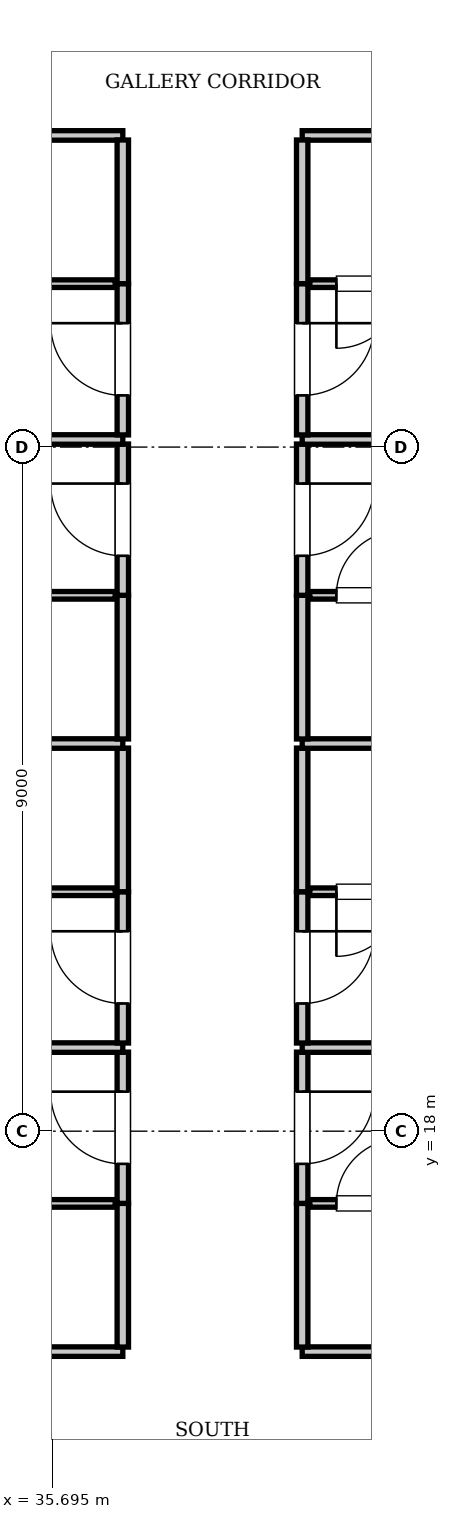
"""IFC4 building model, lengths in metres.
Left out: names, types, materials, properties, quantities, classifications, styles, units other than length and angle.
Written with IfcOpenShell. Run it as: python <this file> out.ifc"""

import sys

from ifc_helpers import new_model, si_unit, direction, frame, frame_2d, origin, place, context, subcontext, project, spatial, rectangle, extrude, element, fill, save


model = new_model("IFC4")
c1 = context("Model", 3, precision=1e-05, world=origin(), true_north=direction((0.0, 1.0)))
c2 = subcontext(c1, "Body", "Model", "MODEL_VIEW")
j1 = project(units=[si_unit("LENGTHUNIT", "METRE"), si_unit("PLANEANGLEUNIT", "RADIAN")], contexts=[c1])
p1 = place(None, origin())
s1 = spatial("IfcSite", under=j1, at=p1, CompositionType="ELEMENT")
p2 = place(p1, origin())
s2 = spatial("IfcBuilding", under=s1, at=p2, CompositionType="ELEMENT")
p3 = place(p2, frame((0.0, 0.0, 127.4)))
s3 = spatial("IfcBuildingStorey", under=s2, at=p3, CompositionType="ELEMENT", Elevation=127.4)
p4 = place(p3, frame((13.2, 15.1, 0.0), z_axis=(0.0, 0.0, 1.0), x_axis=(1.0, 0.0, 0.0)))
e1 = element("IfcWall", 1, at=p4, inside=s3, PredefinedType="PARTITIONING", context=c2, shape_type="SweptSolid", body=[
    extrude(rectangle(XDim=23.42, YDim=0.125, at=frame_2d((11.71, 0.0))), origin(), (0.0, 0.0, 1.0), 3.61),
])
p5 = place(p3, frame((38.98, 15.1, 0.0), z_axis=(0.0, 0.0, 1.0), x_axis=(1.0, 0.0, 0.0)))
e2 = element("IfcWall", 2, at=p5, inside=s3, PredefinedType="PARTITIONING", context=c2, shape_type="SweptSolid", body=[
    extrude(rectangle(XDim=23.42, YDim=0.125, at=frame_2d((11.71, 0.0))), origin(), (0.0, 0.0, 1.0), 3.61),
])
p6 = place(p3, frame((13.2, 31.1, 0.0), z_axis=(0.0, 0.0, 1.0), x_axis=(1.0, 0.0, 0.0)))
e3 = element("IfcWall", 3, at=p6, inside=s3, PredefinedType="PARTITIONING", context=c2, shape_type="SweptSolid", body=[
    extrude(rectangle(XDim=23.42, YDim=0.125, at=frame_2d((11.71, 0.0))), origin(), (0.0, 0.0, 1.0), 3.61),
])
p7 = place(p3, frame((38.98, 31.1, 0.0), z_axis=(0.0, 0.0, 1.0), x_axis=(1.0, 0.0, 0.0)))
e4 = element("IfcWall", 4, at=p7, inside=s3, PredefinedType="PARTITIONING", context=c2, shape_type="SweptSolid", body=[
    extrude(rectangle(XDim=23.42, YDim=0.125, at=frame_2d((11.71, 0.0))), origin(), (0.0, 0.0, 1.0), 3.61),
])
p8 = place(p3, frame((36.62, 15.16, 0.0), z_axis=(0.0, 0.0, 1.0), x_axis=(0.0, 1.0, 0.0)))
e5 = element("IfcWall", 5, at=p8, inside=s3, PredefinedType="PARTITIONING", context=c2, shape_type="SweptSolid", body=[
    extrude(rectangle(XDim=1.89, YDim=0.15, at=frame_2d((0.945, 0.0))), origin(), (0.0, 0.0, 1.0), 3.61),
])
p9 = place(p3, frame((36.62, 17.05, 0.0), z_axis=(0.0, 0.0, 1.0), x_axis=(0.0, 1.0, 0.0)))
e6 = element("IfcWall", 6, at=p9, inside=s3, PredefinedType="PARTITIONING", context=c2, shape_type="SweptSolid", body=[
    extrude(rectangle(XDim=1.99, YDim=0.15, at=frame_2d((0.995, 0.0))), origin(), (0.0, 0.0, 1.0), 3.61),
])
p10 = place(p9, frame((0.52, 0.0, 0.0)))
e7 = element("IfcOpeningElement", 7, at=p10, cuts=e6, PredefinedType="OPENING", context=c2, shape_type="SweptSolid", body=[
    extrude(rectangle(XDim=0.95, YDim=2.15, at=frame_2d((0.475, 1.075))), frame((0.0, 0.085, 0.0), z_axis=(0.0, -1.0, 0.0), x_axis=(1.0, 0.0, 0.0)), (0.0, 0.0, 1.0), 0.17),
])
p11 = place(p3, frame((34.22, 17.05, 0.0), z_axis=(0.0, 0.0, 1.0), x_axis=(1.0, 0.0, 0.0)))
e8 = element("IfcWall", 8, at=p11, inside=s3, PredefinedType="PARTITIONING", context=c2, shape_type="SweptSolid", body=[
    extrude(rectangle(XDim=2.3, YDim=0.1, at=frame_2d((1.15, 0.0))), origin(), (0.0, 0.0, 1.0), 3.61),
])
p12 = place(p11, frame((0.35, 0.0, 0.0)))
e9 = element("IfcOpeningElement", 9, at=p12, cuts=e8, PredefinedType="OPENING", context=c2, shape_type="SweptSolid", body=[
    extrude(rectangle(XDim=0.85, YDim=2.1, at=frame_2d((0.425, 1.05))), frame((0.0, 0.06, 0.0), z_axis=(0.0, -1.0, 0.0), x_axis=(1.0, 0.0, 0.0)), (0.0, 0.0, 1.0), 0.12),
])
p13 = place(p3, frame((38.98, 15.16, 0.0), z_axis=(0.0, 0.0, 1.0), x_axis=(0.0, 1.0, 0.0)))
e10 = element("IfcWall", 10, at=p13, inside=s3, PredefinedType="PARTITIONING", context=c2, shape_type="SweptSolid", body=[
    extrude(rectangle(XDim=1.89, YDim=0.15, at=frame_2d((0.945, 0.0))), origin(), (0.0, 0.0, 1.0), 3.61),
])
p14 = place(p3, frame((38.98, 17.05, 0.0), z_axis=(0.0, 0.0, 1.0), x_axis=(0.0, 1.0, 0.0)))
e11 = element("IfcWall", 11, at=p14, inside=s3, PredefinedType="PARTITIONING", context=c2, shape_type="SweptSolid", body=[
    extrude(rectangle(XDim=1.99, YDim=0.15, at=frame_2d((0.995, 0.0))), origin(), (0.0, 0.0, 1.0), 3.61),
])
p15 = place(p14, frame((0.52, 0.0, 0.0)))
e12 = element("IfcOpeningElement", 12, at=p15, cuts=e11, PredefinedType="OPENING", context=c2, shape_type="SweptSolid", body=[
    extrude(rectangle(XDim=0.95, YDim=2.15, at=frame_2d((0.475, 1.075))), frame((0.0, 0.085, 0.0), z_axis=(0.0, -1.0, 0.0), x_axis=(1.0, 0.0, 0.0)), (0.0, 0.0, 1.0), 0.17),
])
p16 = place(p3, frame((39.08, 17.05, 0.0), z_axis=(0.0, 0.0, 1.0), x_axis=(1.0, 0.0, 0.0)))
e13 = element("IfcWall", 13, at=p16, inside=s3, PredefinedType="PARTITIONING", context=c2, shape_type="SweptSolid", body=[
    extrude(rectangle(XDim=2.3, YDim=0.1, at=frame_2d((1.15, 0.0))), origin(), (0.0, 0.0, 1.0), 3.61),
])
p17 = place(p16, frame((0.35, 0.0, 0.0)))
e14 = element("IfcOpeningElement", 14, at=p17, cuts=e13, PredefinedType="OPENING", context=c2, shape_type="SweptSolid", body=[
    extrude(rectangle(XDim=0.85, YDim=2.1, at=frame_2d((0.425, 1.05))), frame((0.0, 0.06, 0.0), z_axis=(0.0, -1.0, 0.0), x_axis=(1.0, 0.0, 0.0)), (0.0, 0.0, 1.0), 0.12),
])
p18 = place(p3, frame((13.2, 19.1, 0.0), z_axis=(0.0, 0.0, 1.0), x_axis=(1.0, 0.0, 0.0)))
e15 = element("IfcWall", 15, at=p18, inside=s3, PredefinedType="PARTITIONING", context=c2, shape_type="SweptSolid", body=[
    extrude(rectangle(XDim=23.42, YDim=0.125, at=frame_2d((11.71, 0.0))), origin(), (0.0, 0.0, 1.0), 3.61),
])
p19 = place(p3, frame((38.98, 19.1, 0.0), z_axis=(0.0, 0.0, 1.0), x_axis=(1.0, 0.0, 0.0)))
e16 = element("IfcWall", 16, at=p19, inside=s3, PredefinedType="PARTITIONING", context=c2, shape_type="SweptSolid", body=[
    extrude(rectangle(XDim=23.42, YDim=0.125, at=frame_2d((11.71, 0.0))), origin(), (0.0, 0.0, 1.0), 3.61),
])
p20 = place(p3, frame((36.62, 19.16, 0.0), z_axis=(0.0, 0.0, 1.0), x_axis=(0.0, 1.0, 0.0)))
e17 = element("IfcWall", 17, at=p20, inside=s3, PredefinedType="PARTITIONING", context=c2, shape_type="SweptSolid", body=[
    extrude(rectangle(XDim=1.99, YDim=0.15, at=frame_2d((0.995, 0.0))), origin(), (0.0, 0.0, 1.0), 3.61),
])
p21 = place(p20, frame((0.52, 0.0, 0.0)))
e18 = element("IfcOpeningElement", 18, at=p21, cuts=e17, PredefinedType="OPENING", context=c2, shape_type="SweptSolid", body=[
    extrude(rectangle(XDim=0.95, YDim=2.15, at=frame_2d((0.475, 1.075))), frame((0.0, 0.085, 0.0), z_axis=(0.0, -1.0, 0.0), x_axis=(1.0, 0.0, 0.0)), (0.0, 0.0, 1.0), 0.17),
])
p22 = place(p3, frame((36.62, 21.15, 0.0), z_axis=(0.0, 0.0, 1.0), x_axis=(0.0, 1.0, 0.0)))
e19 = element("IfcWall", 19, at=p22, inside=s3, PredefinedType="PARTITIONING", context=c2, shape_type="SweptSolid", body=[
    extrude(rectangle(XDim=1.89, YDim=0.15, at=frame_2d((0.945, 0.0))), origin(), (0.0, 0.0, 1.0), 3.61),
])
p23 = place(p3, frame((34.22, 21.15, 0.0), z_axis=(0.0, 0.0, 1.0), x_axis=(1.0, 0.0, 0.0)))
e20 = element("IfcWall", 20, at=p23, inside=s3, PredefinedType="PARTITIONING", context=c2, shape_type="SweptSolid", body=[
    extrude(rectangle(XDim=2.3, YDim=0.1, at=frame_2d((1.15, 0.0))), origin(), (0.0, 0.0, 1.0), 3.61),
])
p24 = place(p23, frame((0.35, 0.0, 0.0)))
e21 = element("IfcOpeningElement", 21, at=p24, cuts=e20, PredefinedType="OPENING", context=c2, shape_type="SweptSolid", body=[
    extrude(rectangle(XDim=0.85, YDim=2.1, at=frame_2d((0.425, 1.05))), frame((0.0, 0.06, 0.0), z_axis=(0.0, -1.0, 0.0), x_axis=(1.0, 0.0, 0.0)), (0.0, 0.0, 1.0), 0.12),
])
p25 = place(p3, frame((38.98, 19.16, 0.0), z_axis=(0.0, 0.0, 1.0), x_axis=(0.0, 1.0, 0.0)))
e22 = element("IfcWall", 22, at=p25, inside=s3, PredefinedType="PARTITIONING", context=c2, shape_type="SweptSolid", body=[
    extrude(rectangle(XDim=1.99, YDim=0.15, at=frame_2d((0.995, 0.0))), origin(), (0.0, 0.0, 1.0), 3.61),
])
p26 = place(p25, frame((0.52, 0.0, 0.0)))
e23 = element("IfcOpeningElement", 23, at=p26, cuts=e22, PredefinedType="OPENING", context=c2, shape_type="SweptSolid", body=[
    extrude(rectangle(XDim=0.95, YDim=2.15, at=frame_2d((0.475, 1.075))), frame((0.0, 0.085, 0.0), z_axis=(0.0, -1.0, 0.0), x_axis=(1.0, 0.0, 0.0)), (0.0, 0.0, 1.0), 0.17),
])
p27 = place(p3, frame((38.98, 21.15, 0.0), z_axis=(0.0, 0.0, 1.0), x_axis=(0.0, 1.0, 0.0)))
e24 = element("IfcWall", 24, at=p27, inside=s3, PredefinedType="PARTITIONING", context=c2, shape_type="SweptSolid", body=[
    extrude(rectangle(XDim=1.89, YDim=0.15, at=frame_2d((0.945, 0.0))), origin(), (0.0, 0.0, 1.0), 3.61),
])
p28 = place(p3, frame((39.08, 21.15, 0.0), z_axis=(0.0, 0.0, 1.0), x_axis=(1.0, 0.0, 0.0)))
e25 = element("IfcWall", 25, at=p28, inside=s3, PredefinedType="PARTITIONING", context=c2, shape_type="SweptSolid", body=[
    extrude(rectangle(XDim=2.3, YDim=0.1, at=frame_2d((1.15, 0.0))), origin(), (0.0, 0.0, 1.0), 3.61),
])
p29 = place(p28, frame((0.35, 0.0, 0.0)))
e26 = element("IfcOpeningElement", 26, at=p29, cuts=e25, PredefinedType="OPENING", context=c2, shape_type="SweptSolid", body=[
    extrude(rectangle(XDim=0.85, YDim=2.1, at=frame_2d((0.425, 1.05))), frame((0.0, 0.06, 0.0), z_axis=(0.0, -1.0, 0.0), x_axis=(1.0, 0.0, 0.0)), (0.0, 0.0, 1.0), 0.12),
])
p30 = place(p3, frame((13.2, 23.1, 0.0), z_axis=(0.0, 0.0, 1.0), x_axis=(1.0, 0.0, 0.0)))
e27 = element("IfcWall", 27, at=p30, inside=s3, PredefinedType="PARTITIONING", context=c2, shape_type="SweptSolid", body=[
    extrude(rectangle(XDim=23.42, YDim=0.125, at=frame_2d((11.71, 0.0))), origin(), (0.0, 0.0, 1.0), 3.61),
])
p31 = place(p3, frame((38.98, 23.1, 0.0), z_axis=(0.0, 0.0, 1.0), x_axis=(1.0, 0.0, 0.0)))
e28 = element("IfcWall", 28, at=p31, inside=s3, PredefinedType="PARTITIONING", context=c2, shape_type="SweptSolid", body=[
    extrude(rectangle(XDim=23.42, YDim=0.125, at=frame_2d((11.71, 0.0))), origin(), (0.0, 0.0, 1.0), 3.61),
])
p32 = place(p3, frame((36.62, 23.16, 0.0), z_axis=(0.0, 0.0, 1.0), x_axis=(0.0, 1.0, 0.0)))
e29 = element("IfcWall", 29, at=p32, inside=s3, PredefinedType="PARTITIONING", context=c2, shape_type="SweptSolid", body=[
    extrude(rectangle(XDim=1.89, YDim=0.15, at=frame_2d((0.945, 0.0))), origin(), (0.0, 0.0, 1.0), 3.61),
])
p33 = place(p3, frame((36.62, 25.05, 0.0), z_axis=(0.0, 0.0, 1.0), x_axis=(0.0, 1.0, 0.0)))
e30 = element("IfcWall", 30, at=p33, inside=s3, PredefinedType="PARTITIONING", context=c2, shape_type="SweptSolid", body=[
    extrude(rectangle(XDim=1.99, YDim=0.15, at=frame_2d((0.995, 0.0))), origin(), (0.0, 0.0, 1.0), 3.61),
])
p34 = place(p33, frame((0.52, 0.0, 0.0)))
e31 = element("IfcOpeningElement", 31, at=p34, cuts=e30, PredefinedType="OPENING", context=c2, shape_type="SweptSolid", body=[
    extrude(rectangle(XDim=0.95, YDim=2.15, at=frame_2d((0.475, 1.075))), frame((0.0, 0.085, 0.0), z_axis=(0.0, -1.0, 0.0), x_axis=(1.0, 0.0, 0.0)), (0.0, 0.0, 1.0), 0.17),
])
p35 = place(p3, frame((34.22, 25.05, 0.0), z_axis=(0.0, 0.0, 1.0), x_axis=(1.0, 0.0, 0.0)))
e32 = element("IfcWall", 32, at=p35, inside=s3, PredefinedType="PARTITIONING", context=c2, shape_type="SweptSolid", body=[
    extrude(rectangle(XDim=2.3, YDim=0.1, at=frame_2d((1.15, 0.0))), origin(), (0.0, 0.0, 1.0), 3.61),
])
p36 = place(p35, frame((0.35, 0.0, 0.0)))
e33 = element("IfcOpeningElement", 33, at=p36, cuts=e32, PredefinedType="OPENING", context=c2, shape_type="SweptSolid", body=[
    extrude(rectangle(XDim=0.85, YDim=2.1, at=frame_2d((0.425, 1.05))), frame((0.0, 0.06, 0.0), z_axis=(0.0, -1.0, 0.0), x_axis=(1.0, 0.0, 0.0)), (0.0, 0.0, 1.0), 0.12),
])
p37 = place(p3, frame((38.98, 23.16, 0.0), z_axis=(0.0, 0.0, 1.0), x_axis=(0.0, 1.0, 0.0)))
e34 = element("IfcWall", 34, at=p37, inside=s3, PredefinedType="PARTITIONING", context=c2, shape_type="SweptSolid", body=[
    extrude(rectangle(XDim=1.89, YDim=0.15, at=frame_2d((0.945, 0.0))), origin(), (0.0, 0.0, 1.0), 3.61),
])
p38 = place(p3, frame((38.98, 25.05, 0.0), z_axis=(0.0, 0.0, 1.0), x_axis=(0.0, 1.0, 0.0)))
e35 = element("IfcWall", 35, at=p38, inside=s3, PredefinedType="PARTITIONING", context=c2, shape_type="SweptSolid", body=[
    extrude(rectangle(XDim=1.99, YDim=0.15, at=frame_2d((0.995, 0.0))), origin(), (0.0, 0.0, 1.0), 3.61),
])
p39 = place(p38, frame((0.52, 0.0, 0.0)))
e36 = element("IfcOpeningElement", 36, at=p39, cuts=e35, PredefinedType="OPENING", context=c2, shape_type="SweptSolid", body=[
    extrude(rectangle(XDim=0.95, YDim=2.15, at=frame_2d((0.475, 1.075))), frame((0.0, 0.085, 0.0), z_axis=(0.0, -1.0, 0.0), x_axis=(1.0, 0.0, 0.0)), (0.0, 0.0, 1.0), 0.17),
])
p40 = place(p3, frame((39.08, 25.05, 0.0), z_axis=(0.0, 0.0, 1.0), x_axis=(1.0, 0.0, 0.0)))
e37 = element("IfcWall", 37, at=p40, inside=s3, PredefinedType="PARTITIONING", context=c2, shape_type="SweptSolid", body=[
    extrude(rectangle(XDim=2.3, YDim=0.1, at=frame_2d((1.15, 0.0))), origin(), (0.0, 0.0, 1.0), 3.61),
])
p41 = place(p40, frame((0.35, 0.0, 0.0)))
e38 = element("IfcOpeningElement", 38, at=p41, cuts=e37, PredefinedType="OPENING", context=c2, shape_type="SweptSolid", body=[
    extrude(rectangle(XDim=0.85, YDim=2.1, at=frame_2d((0.425, 1.05))), frame((0.0, 0.06, 0.0), z_axis=(0.0, -1.0, 0.0), x_axis=(1.0, 0.0, 0.0)), (0.0, 0.0, 1.0), 0.12),
])
p42 = place(p3, frame((13.2, 27.1, 0.0), z_axis=(0.0, 0.0, 1.0), x_axis=(1.0, 0.0, 0.0)))
e39 = element("IfcWall", 39, at=p42, inside=s3, PredefinedType="PARTITIONING", context=c2, shape_type="SweptSolid", body=[
    extrude(rectangle(XDim=23.42, YDim=0.125, at=frame_2d((11.71, 0.0))), origin(), (0.0, 0.0, 1.0), 2.41),
])
p43 = place(p3, frame((38.98, 27.1, 0.0), z_axis=(0.0, 0.0, 1.0), x_axis=(1.0, 0.0, 0.0)))
e40 = element("IfcWall", 40, at=p43, inside=s3, PredefinedType="PARTITIONING", context=c2, shape_type="SweptSolid", body=[
    extrude(rectangle(XDim=23.42, YDim=0.125, at=frame_2d((11.71, 0.0))), origin(), (0.0, 0.0, 1.0), 2.41),
])
p44 = place(p3, frame((36.62, 27.16, 0.0), z_axis=(0.0, 0.0, 1.0), x_axis=(0.0, 1.0, 0.0)))
e41 = element("IfcWall", 41, at=p44, inside=s3, PredefinedType="PARTITIONING", context=c2, shape_type="SweptSolid", body=[
    extrude(rectangle(XDim=1.99, YDim=0.15, at=frame_2d((0.995, 0.0))), origin(), (0.0, 0.0, 1.0), 3.61),
])
p45 = place(p44, frame((0.52, 0.0, 0.0)))
e42 = element("IfcOpeningElement", 42, at=p45, cuts=e41, PredefinedType="OPENING", context=c2, shape_type="SweptSolid", body=[
    extrude(rectangle(XDim=0.95, YDim=2.15, at=frame_2d((0.475, 1.075))), frame((0.0, 0.085, 0.0), z_axis=(0.0, -1.0, 0.0), x_axis=(1.0, 0.0, 0.0)), (0.0, 0.0, 1.0), 0.17),
])
p46 = place(p3, frame((36.62, 29.15, 0.0), z_axis=(0.0, 0.0, 1.0), x_axis=(0.0, 1.0, 0.0)))
e43 = element("IfcWall", 43, at=p46, inside=s3, PredefinedType="PARTITIONING", context=c2, shape_type="SweptSolid", body=[
    extrude(rectangle(XDim=1.89, YDim=0.15, at=frame_2d((0.945, 0.0))), origin(), (0.0, 0.0, 1.0), 3.61),
])
p47 = place(p3, frame((34.22, 29.15, 0.0), z_axis=(0.0, 0.0, 1.0), x_axis=(1.0, 0.0, 0.0)))
e44 = element("IfcWall", 44, at=p47, inside=s3, PredefinedType="PARTITIONING", context=c2, shape_type="SweptSolid", body=[
    extrude(rectangle(XDim=2.3, YDim=0.1, at=frame_2d((1.15, 0.0))), origin(), (0.0, 0.0, 1.0), 3.61),
])
p48 = place(p47, frame((0.35, 0.0, 0.0)))
e45 = element("IfcOpeningElement", 45, at=p48, cuts=e44, PredefinedType="OPENING", context=c2, shape_type="SweptSolid", body=[
    extrude(rectangle(XDim=0.85, YDim=2.1, at=frame_2d((0.425, 1.05))), frame((0.0, 0.06, 0.0), z_axis=(0.0, -1.0, 0.0), x_axis=(1.0, 0.0, 0.0)), (0.0, 0.0, 1.0), 0.12),
])
p49 = place(p3, frame((38.98, 27.16, 0.0), z_axis=(0.0, 0.0, 1.0), x_axis=(0.0, 1.0, 0.0)))
e46 = element("IfcWall", 46, at=p49, inside=s3, PredefinedType="PARTITIONING", context=c2, shape_type="SweptSolid", body=[
    extrude(rectangle(XDim=1.99, YDim=0.15, at=frame_2d((0.995, 0.0))), origin(), (0.0, 0.0, 1.0), 3.61),
])
p50 = place(p49, frame((0.52, 0.0, 0.0)))
e47 = element("IfcOpeningElement", 47, at=p50, cuts=e46, PredefinedType="OPENING", context=c2, shape_type="SweptSolid", body=[
    extrude(rectangle(XDim=0.95, YDim=2.15, at=frame_2d((0.475, 1.075))), frame((0.0, 0.085, 0.0), z_axis=(0.0, -1.0, 0.0), x_axis=(1.0, 0.0, 0.0)), (0.0, 0.0, 1.0), 0.17),
])
p51 = place(p3, frame((38.98, 29.15, 0.0), z_axis=(0.0, 0.0, 1.0), x_axis=(0.0, 1.0, 0.0)))
e48 = element("IfcWall", 48, at=p51, inside=s3, PredefinedType="PARTITIONING", context=c2, shape_type="SweptSolid", body=[
    extrude(rectangle(XDim=1.89, YDim=0.15, at=frame_2d((0.945, 0.0))), origin(), (0.0, 0.0, 1.0), 3.61),
])
p52 = place(p3, frame((39.08, 29.15, 0.0), z_axis=(0.0, 0.0, 1.0), x_axis=(1.0, 0.0, 0.0)))
e49 = element("IfcWall", 49, at=p52, inside=s3, PredefinedType="PARTITIONING", context=c2, shape_type="SweptSolid", body=[
    extrude(rectangle(XDim=2.3, YDim=0.1, at=frame_2d((1.15, 0.0))), origin(), (0.0, 0.0, 1.0), 3.61),
])
p53 = place(p52, frame((0.35, 0.0, 0.0)))
e50 = element("IfcOpeningElement", 50, at=p53, cuts=e49, PredefinedType="OPENING", context=c2, shape_type="SweptSolid", body=[
    extrude(rectangle(XDim=0.85, YDim=2.1, at=frame_2d((0.425, 1.05))), frame((0.0, 0.06, 0.0), z_axis=(0.0, -1.0, 0.0), x_axis=(1.0, 0.0, 0.0)), (0.0, 0.0, 1.0), 0.12),
])
p54 = place(p10, origin())
e51 = element("IfcDoor", 51, at=p54, inside=s3, OperationType="SINGLE_SWING_RIGHT", PredefinedType="DOOR", context=c2, shape_type="SweptSolid", body=[
    extrude(rectangle(XDim=0.95, YDim=2.15, at=frame_2d((0.475, 1.075))), frame((0.0, 0.025, 0.0), z_axis=(0.0, -1.0, 0.0), x_axis=(1.0, 0.0, 0.0)), (0.0, 0.0, 1.0), 0.05),
])
fill(e7, e51)
p55 = place(p17, origin())
e52 = element("IfcDoor", 52, at=p55, inside=s3, OperationType="SINGLE_SWING_RIGHT", PredefinedType="DOOR", context=c2, shape_type="SweptSolid", body=[
    extrude(rectangle(XDim=0.85, YDim=2.1, at=frame_2d((0.425, 1.05))), frame((0.0, 0.025, 0.0), z_axis=(0.0, -1.0, 0.0), x_axis=(1.0, 0.0, 0.0)), (0.0, 0.0, 1.0), 0.05),
])
fill(e14, e52)
p56 = place(p15, frame((0.95, 0.0, 0.0), z_axis=(0.0, 0.0, 1.0), x_axis=(-1.0, 0.0, 0.0)))
e53 = element("IfcDoor", 53, at=p56, inside=s3, OperationType="SINGLE_SWING_LEFT", PredefinedType="DOOR", context=c2, shape_type="SweptSolid", body=[
    extrude(rectangle(XDim=0.95, YDim=2.15, at=frame_2d((0.475, 1.075))), frame((0.0, 0.025, 0.0), z_axis=(0.0, -1.0, 0.0), x_axis=(1.0, 0.0, 0.0)), (0.0, 0.0, 1.0), 0.05),
])
fill(e12, e53)
p57 = place(p21, origin())
e54 = element("IfcDoor", 54, at=p57, inside=s3, OperationType="SINGLE_SWING_RIGHT", PredefinedType="DOOR", context=c2, shape_type="SweptSolid", body=[
    extrude(rectangle(XDim=0.95, YDim=2.15, at=frame_2d((0.475, 1.075))), frame((0.0, 0.025, 0.0), z_axis=(0.0, -1.0, 0.0), x_axis=(1.0, 0.0, 0.0)), (0.0, 0.0, 1.0), 0.05),
])
fill(e18, e54)
p58 = place(p29, frame((0.85, 0.0, 0.0), z_axis=(0.0, 0.0, 1.0), x_axis=(-1.0, 0.0, 0.0)))
e55 = element("IfcDoor", 55, at=p58, inside=s3, OperationType="SINGLE_SWING_RIGHT", PredefinedType="DOOR", context=c2, shape_type="SweptSolid", body=[
    extrude(rectangle(XDim=0.85, YDim=2.1, at=frame_2d((0.425, 1.05))), frame((0.0, 0.025, 0.0), z_axis=(0.0, -1.0, 0.0), x_axis=(1.0, 0.0, 0.0)), (0.0, 0.0, 1.0), 0.05),
])
fill(e26, e55)
p59 = place(p26, frame((0.95, 0.0, 0.0), z_axis=(0.0, 0.0, 1.0), x_axis=(-1.0, 0.0, 0.0)))
e56 = element("IfcDoor", 56, at=p59, inside=s3, OperationType="SINGLE_SWING_LEFT", PredefinedType="DOOR", context=c2, shape_type="SweptSolid", body=[
    extrude(rectangle(XDim=0.95, YDim=2.15, at=frame_2d((0.475, 1.075))), frame((0.0, 0.025, 0.0), z_axis=(0.0, -1.0, 0.0), x_axis=(1.0, 0.0, 0.0)), (0.0, 0.0, 1.0), 0.05),
])
fill(e23, e56)
p60 = place(p34, origin())
e57 = element("IfcDoor", 57, at=p60, inside=s3, OperationType="SINGLE_SWING_RIGHT", PredefinedType="DOOR", context=c2, shape_type="SweptSolid", body=[
    extrude(rectangle(XDim=0.95, YDim=2.15, at=frame_2d((0.475, 1.075))), frame((0.0, 0.025, 0.0), z_axis=(0.0, -1.0, 0.0), x_axis=(1.0, 0.0, 0.0)), (0.0, 0.0, 1.0), 0.05),
])
fill(e31, e57)
p61 = place(p41, origin())
e58 = element("IfcDoor", 58, at=p61, inside=s3, OperationType="SINGLE_SWING_RIGHT", PredefinedType="DOOR", context=c2, shape_type="SweptSolid", body=[
    extrude(rectangle(XDim=0.85, YDim=2.1, at=frame_2d((0.425, 1.05))), frame((0.0, 0.025, 0.0), z_axis=(0.0, -1.0, 0.0), x_axis=(1.0, 0.0, 0.0)), (0.0, 0.0, 1.0), 0.05),
])
fill(e38, e58)
p62 = place(p39, frame((0.95, 0.0, 0.0), z_axis=(0.0, 0.0, 1.0), x_axis=(-1.0, 0.0, 0.0)))
e59 = element("IfcDoor", 59, at=p62, inside=s3, OperationType="SINGLE_SWING_LEFT", PredefinedType="DOOR", context=c2, shape_type="SweptSolid", body=[
    extrude(rectangle(XDim=0.95, YDim=2.15, at=frame_2d((0.475, 1.075))), frame((0.0, 0.025, 0.0), z_axis=(0.0, -1.0, 0.0), x_axis=(1.0, 0.0, 0.0)), (0.0, 0.0, 1.0), 0.05),
])
fill(e36, e59)
p63 = place(p45, origin())
e60 = element("IfcDoor", 60, at=p63, inside=s3, OperationType="SINGLE_SWING_RIGHT", PredefinedType="DOOR", context=c2, shape_type="SweptSolid", body=[
    extrude(rectangle(XDim=0.95, YDim=2.15, at=frame_2d((0.475, 1.075))), frame((0.0, 0.025, 0.0), z_axis=(0.0, -1.0, 0.0), x_axis=(1.0, 0.0, 0.0)), (0.0, 0.0, 1.0), 0.05),
])
fill(e42, e60)
p64 = place(p53, frame((0.85, 0.0, 0.0), z_axis=(0.0, 0.0, 1.0), x_axis=(-1.0, 0.0, 0.0)))
e61 = element("IfcDoor", 61, at=p64, inside=s3, OperationType="SINGLE_SWING_RIGHT", PredefinedType="DOOR", context=c2, shape_type="SweptSolid", body=[
    extrude(rectangle(XDim=0.85, YDim=2.1, at=frame_2d((0.425, 1.05))), frame((0.0, 0.025, 0.0), z_axis=(0.0, -1.0, 0.0), x_axis=(1.0, 0.0, 0.0)), (0.0, 0.0, 1.0), 0.05),
])
fill(e50, e61)
p65 = place(p50, frame((0.95, 0.0, 0.0), z_axis=(0.0, 0.0, 1.0), x_axis=(-1.0, 0.0, 0.0)))
e62 = element("IfcDoor", 62, at=p65, inside=s3, OperationType="SINGLE_SWING_LEFT", PredefinedType="DOOR", context=c2, shape_type="SweptSolid", body=[
    extrude(rectangle(XDim=0.95, YDim=2.15, at=frame_2d((0.475, 1.075))), frame((0.0, 0.025, 0.0), z_axis=(0.0, -1.0, 0.0), x_axis=(1.0, 0.0, 0.0)), (0.0, 0.0, 1.0), 0.05),
])
fill(e47, e62)
save(model, sys.argv[1])
